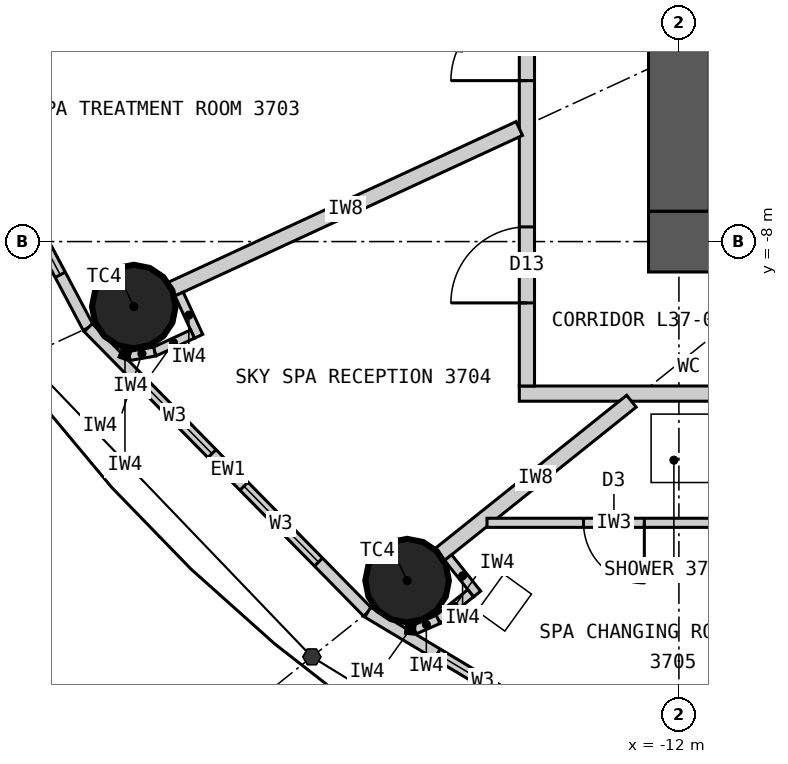
"""IFC4 building model, lengths in metres.
Left out: names, types, materials, properties, quantities, classifications, styles, units other than length and angle.
Written with IfcOpenShell. Run it as: python <this file> out.ifc"""

import sys

from ifc_helpers import new_model, si_unit, direction, frame, frame_2d, origin, origin_2d, place, context, subcontext, project, spatial, rectangle, circle, extrude, element, fill, save


model = new_model("IFC4")
c1 = context("Model", 3, precision=1e-05, world=origin(), true_north=direction((0.0, 1.0)))
c2 = subcontext(c1, "Body", "Model", "MODEL_VIEW")
j1 = project(units=[si_unit("LENGTHUNIT", "METRE"), si_unit("PLANEANGLEUNIT", "RADIAN")], contexts=[c1])
p1 = place(None, origin())
s1 = spatial("IfcSite", under=j1, at=p1, CompositionType="ELEMENT")
p2 = place(p1, origin())
s2 = spatial("IfcBuilding", under=s1, at=p2, CompositionType="ELEMENT")
p3 = place(p2, frame((0.0, 0.0, 143.4)))
s3 = spatial("IfcBuildingStorey", under=s2, at=p3, CompositionType="ELEMENT", Elevation=143.4)
for number, where, z_axis, x_axis in (
    (1, (-19.172, -8.855, 0.0), (0.0, 0.0, 1.0), (1.0, 0.0, 0.0)),
    (2, (-15.576, -12.461, 0.0), (0.0, 0.0, 1.0), (1.0, 0.0, 0.0)),
):
    element("IfcColumn", number, at=place(p3, frame(where, z_axis=z_axis, x_axis=x_axis)), inside=s3, PredefinedType="COLUMN", context=c2, shape_type="SweptSolid", body=[
        extrude(circle(Radius=0.55, at=origin_2d()), origin(), (0.0, 0.0, 1.0), 3.3),
    ])
p4 = place(p3, frame((12.4, -8.0, 0.0), z_axis=(0.0, 0.0, 1.0), x_axis=(-1.0, 0.0, 0.0)))
e3 = element("IfcWall", 3, at=p4, inside=s3, PredefinedType="SHEAR", context=c2, shape_type="SweptSolid", body=[
    extrude(rectangle(XDim=24.8, YDim=0.8, at=frame_2d((12.4, 0.0))), origin(), (0.0, 0.0, 1.0), 3.3),
])
p5 = place(p4, frame((11.1, 0.0, 0.0)))
e4 = element("IfcOpeningElement", 4, at=p5, cuts=e3, PredefinedType="OPENING", context=c2, shape_type="SweptSolid", body=[
    extrude(rectangle(XDim=1.2, YDim=2.2, at=frame_2d((0.6, 1.1))), frame((0.0, 0.41, 0.0), z_axis=(0.0, -1.0, 0.0), x_axis=(1.0, 0.0, 0.0)), (0.0, 0.0, 1.0), 0.82),
])
p6 = place(p4, frame((18.7, 0.0, 0.0)))
e5 = element("IfcOpeningElement", 5, at=p6, cuts=e3, PredefinedType="OPENING", context=c2, shape_type="SweptSolid", body=[
    extrude(rectangle(XDim=0.9, YDim=2.2, at=frame_2d((0.45, 1.1))), frame((0.0, 0.41, 0.0), z_axis=(0.0, -1.0, 0.0), x_axis=(1.0, 0.0, 0.0)), (0.0, 0.0, 1.0), 0.82),
])
p7 = place(p3, frame((-12.0, 7.6, 0.0), z_axis=(0.0, 0.0, 1.0), x_axis=(0.0, -1.0, 0.0)))
e6 = element("IfcWall", 6, at=p7, inside=s3, PredefinedType="SHEAR", context=c2, shape_type="SweptSolid", body=[
    extrude(rectangle(XDim=15.2, YDim=0.8, at=frame_2d((7.6, 0.0))), origin(), (0.0, 0.0, 1.0), 3.3),
])
p8 = place(p7, frame((6.7, 0.0, 0.0)))
e7 = element("IfcOpeningElement", 7, at=p8, cuts=e6, PredefinedType="OPENING", context=c2, shape_type="SweptSolid", body=[
    extrude(rectangle(XDim=1.8, YDim=2.2, at=frame_2d((0.9, 1.1))), frame((0.0, 0.41, 0.0), z_axis=(0.0, -1.0, 0.0), x_axis=(1.0, 0.0, 0.0)), (0.0, 0.0, 1.0), 0.82),
])
p9 = place(p3, frame((-22.102, -4.738, 0.0), z_axis=(0.0, 0.0, 1.0), x_axis=(0.468428906714, -0.883501193748, 0.0)))
e8 = element("IfcWall", 8, at=p9, inside=s3, PredefinedType="ELEMENTEDWALL", context=c2, shape_type="SweptSolid", body=[
    extrude(rectangle(XDim=4.974, YDim=0.15, at=frame_2d((2.487, 0.0))), origin(), (0.0, 0.0, 1.0), 3.12),
])
p10 = place(p9, frame((0.787, 0.0, 0.9)))
e9 = element("IfcOpeningElement", 9, at=p10, cuts=e8, PredefinedType="OPENING", context=c2, shape_type="SweptSolid", body=[
    extrude(rectangle(XDim=1.4, YDim=1.9, at=frame_2d((0.7, 0.95))), frame((0.0, 0.085, 0.0), z_axis=(0.0, -1.0, 0.0), x_axis=(1.0, 0.0, 0.0)), (0.0, 0.0, 1.0), 0.17),
])
p11 = place(p9, frame((2.787, 0.0, 0.9)))
e10 = element("IfcOpeningElement", 10, at=p11, cuts=e8, PredefinedType="OPENING", context=c2, shape_type="SweptSolid", body=[
    extrude(rectangle(XDim=1.4, YDim=1.9, at=frame_2d((0.7, 0.95))), frame((0.0, 0.085, 0.0), z_axis=(0.0, -1.0, 0.0), x_axis=(1.0, 0.0, 0.0)), (0.0, 0.0, 1.0), 0.17),
])
p12 = place(p3, frame((-19.772, -9.132, 0.0), z_axis=(0.0, 0.0, 1.0), x_axis=(0.700727467776, -0.71342905457, 0.0)))
e11 = element("IfcWall", 11, at=p12, inside=s3, PredefinedType="ELEMENTEDWALL", context=c2, shape_type="SweptSolid", body=[
    extrude(rectangle(XDim=5.247, YDim=0.15, at=frame_2d((2.624, 0.0))), origin(), (0.0, 0.0, 1.0), 3.12),
])
p13 = place(p12, frame((0.924, 0.0, 0.9)))
e12 = element("IfcOpeningElement", 12, at=p13, cuts=e11, PredefinedType="OPENING", context=c2, shape_type="SweptSolid", body=[
    extrude(rectangle(XDim=1.4, YDim=1.9, at=frame_2d((0.7, 0.95))), frame((0.0, 0.085, 0.0), z_axis=(0.0, -1.0, 0.0), x_axis=(1.0, 0.0, 0.0)), (0.0, 0.0, 1.0), 0.17),
])
p14 = place(p12, frame((2.924, 0.0, 0.9)))
e13 = element("IfcOpeningElement", 13, at=p14, cuts=e11, PredefinedType="OPENING", context=c2, shape_type="SweptSolid", body=[
    extrude(rectangle(XDim=1.4, YDim=1.9, at=frame_2d((0.7, 0.95))), frame((0.0, 0.085, 0.0), z_axis=(0.0, -1.0, 0.0), x_axis=(1.0, 0.0, 0.0)), (0.0, 0.0, 1.0), 0.17),
])
p15 = place(p3, frame((-16.095, -12.876, 0.0), z_axis=(0.0, 0.0, 1.0), x_axis=(0.857695199231, -0.514158482587, 0.0)))
e14 = element("IfcWall", 14, at=p15, inside=s3, PredefinedType="ELEMENTEDWALL", context=c2, shape_type="SweptSolid", body=[
    extrude(rectangle(XDim=5.536, YDim=0.15, at=frame_2d((2.768, 0.0))), origin(), (0.0, 0.0, 1.0), 3.12),
])
p16 = place(p15, frame((1.068, 0.0, 0.9)))
e15 = element("IfcOpeningElement", 15, at=p16, cuts=e14, PredefinedType="OPENING", context=c2, shape_type="SweptSolid", body=[
    extrude(rectangle(XDim=1.4, YDim=1.9, at=frame_2d((0.7, 0.95))), frame((0.0, 0.085, 0.0), z_axis=(0.0, -1.0, 0.0), x_axis=(1.0, 0.0, 0.0)), (0.0, 0.0, 1.0), 0.17),
])
p17 = place(p15, frame((3.068, 0.0, 0.9)))
e16 = element("IfcOpeningElement", 16, at=p17, cuts=e14, PredefinedType="OPENING", context=c2, shape_type="SweptSolid", body=[
    extrude(rectangle(XDim=1.4, YDim=1.9, at=frame_2d((0.7, 0.95))), frame((0.0, 0.085, 0.0), z_axis=(0.0, -1.0, 0.0), x_axis=(1.0, 0.0, 0.0)), (0.0, 0.0, 1.0), 0.17),
])
p18 = place(p3, frame((14.1, -10.0, 0.0), z_axis=(0.0, 0.0, 1.0), x_axis=(-1.0, 0.0, 0.0)))
e17 = element("IfcWall", 17, at=p18, inside=s3, PredefinedType="PARTITIONING", context=c2, shape_type="SweptSolid", body=[
    extrude(rectangle(XDim=28.2, YDim=0.2, at=frame_2d((14.1, 0.0))), origin(), (0.0, 0.0, 1.0), 3.12),
])
p19 = place(p18, frame((23.045, 0.0, 0.0)))
e18 = element("IfcOpeningElement", 18, at=p19, cuts=e17, PredefinedType="OPENING", context=c2, shape_type="SweptSolid", body=[
    extrude(rectangle(XDim=1.0, YDim=2.2, at=frame_2d((0.5, 1.1))), frame((0.0, 0.11, 0.0), z_axis=(0.0, -1.0, 0.0), x_axis=(1.0, 0.0, 0.0)), (0.0, 0.0, 1.0), 0.22),
])
p20 = place(p18, frame((18.529, 0.0, 0.0)))
e19 = element("IfcOpeningElement", 19, at=p20, cuts=e17, PredefinedType="OPENING", context=c2, shape_type="SweptSolid", body=[
    extrude(rectangle(XDim=1.0, YDim=2.2, at=frame_2d((0.5, 1.1))), frame((0.0, 0.11, 0.0), z_axis=(0.0, -1.0, 0.0), x_axis=(1.0, 0.0, 0.0)), (0.0, 0.0, 1.0), 0.22),
])
p21 = place(p18, frame((13.923, 0.0, 0.0)))
e20 = element("IfcOpeningElement", 20, at=p21, cuts=e17, PredefinedType="OPENING", context=c2, shape_type="SweptSolid", body=[
    extrude(rectangle(XDim=1.0, YDim=2.2, at=frame_2d((0.5, 1.1))), frame((0.0, 0.11, 0.0), z_axis=(0.0, -1.0, 0.0), x_axis=(1.0, 0.0, 0.0)), (0.0, 0.0, 1.0), 0.22),
])
p22 = place(p18, frame((9.35, 0.0, 0.0)))
e21 = element("IfcOpeningElement", 21, at=p22, cuts=e17, PredefinedType="OPENING", context=c2, shape_type="SweptSolid", body=[
    extrude(rectangle(XDim=1.6, YDim=2.4, at=frame_2d((0.8, 1.2))), frame((0.0, 0.11, 0.0), z_axis=(0.0, -1.0, 0.0), x_axis=(1.0, 0.0, 0.0)), (0.0, 0.0, 1.0), 0.22),
])
p23 = place(p3, frame((-14.0, 9.9, 0.0), z_axis=(0.0, 0.0, 1.0), x_axis=(0.0, -1.0, 0.0)))
e22 = element("IfcWall", 22, at=p23, inside=s3, PredefinedType="PARTITIONING", context=c2, shape_type="SweptSolid", body=[
    extrude(rectangle(XDim=19.8, YDim=0.2, at=frame_2d((9.9, 0.0))), origin(), (0.0, 0.0, 1.0), 3.12),
])
p24 = place(p23, frame((8.718, 0.0, 0.0)))
e23 = element("IfcOpeningElement", 23, at=p24, cuts=e22, PredefinedType="OPENING", context=c2, shape_type="SweptSolid", body=[
    extrude(rectangle(XDim=1.0, YDim=2.2, at=frame_2d((0.5, 1.1))), frame((0.0, 0.11, 0.0), z_axis=(0.0, -1.0, 0.0), x_axis=(1.0, 0.0, 0.0)), (0.0, 0.0, 1.0), 0.22),
])
p25 = place(p23, frame((11.74, 0.0, 0.0)))
e24 = element("IfcOpeningElement", 24, at=p25, cuts=e22, PredefinedType="OPENING", context=c2, shape_type="SweptSolid", body=[
    extrude(rectangle(XDim=1.0, YDim=2.2, at=frame_2d((0.5, 1.1))), frame((0.0, 0.11, 0.0), z_axis=(0.0, -1.0, 0.0), x_axis=(1.0, 0.0, 0.0)), (0.0, 0.0, 1.0), 0.22),
])
p26 = place(p23, frame((14.782, 0.0, 0.0)))
e25 = element("IfcOpeningElement", 25, at=p26, cuts=e22, PredefinedType="OPENING", context=c2, shape_type="SweptSolid", body=[
    extrude(rectangle(XDim=1.0, YDim=2.2, at=frame_2d((0.5, 1.1))), frame((0.0, 0.11, 0.0), z_axis=(0.0, -1.0, 0.0), x_axis=(1.0, 0.0, 0.0)), (0.0, 0.0, 1.0), 0.22),
])
p27 = place(p23, frame((17.707, 0.0, 0.0)))
e26 = element("IfcOpeningElement", 26, at=p27, cuts=e22, PredefinedType="OPENING", context=c2, shape_type="SweptSolid", body=[
    extrude(rectangle(XDim=1.0, YDim=2.2, at=frame_2d((0.5, 1.1))), frame((0.0, 0.11, 0.0), z_axis=(0.0, -1.0, 0.0), x_axis=(1.0, 0.0, 0.0)), (0.0, 0.0, 1.0), 0.22),
])
p28 = place(p23, frame((3.824, 0.0, 0.0)))
e27 = element("IfcOpeningElement", 27, at=p28, cuts=e22, PredefinedType="OPENING", context=c2, shape_type="SweptSolid", body=[
    extrude(rectangle(XDim=1.0, YDim=2.2, at=frame_2d((0.5, 1.1))), frame((0.0, 0.11, 0.0), z_axis=(0.0, -1.0, 0.0), x_axis=(1.0, 0.0, 0.0)), (0.0, 0.0, 1.0), 0.22),
])
p29 = place(p3, frame((-14.1, -6.512, 0.0), z_axis=(0.0, 0.0, 1.0), x_axis=(-0.907823150669, -0.419353224751, 0.0)))
e28 = element("IfcWall", 28, at=p29, inside=s3, PredefinedType="PARTITIONING", context=c2, shape_type="SweptSolid", body=[
    extrude(rectangle(XDim=5.037, YDim=0.2, at=frame_2d((2.519, 0.0))), origin(), (0.0, 0.0, 1.0), 2.22),
])
p30 = place(p3, frame((-12.625, -10.1, 0.0), z_axis=(0.0, 0.0, 1.0), x_axis=(-0.780876185034, -0.624685827954, 0.0)))
e29 = element("IfcWall", 29, at=p30, inside=s3, PredefinedType="PARTITIONING", context=c2, shape_type="SweptSolid", body=[
    extrude(rectangle(XDim=3.229, YDim=0.2, at=frame_2d((1.615, 0.0))), origin(), (0.0, 0.0, 1.0), 2.27),
])
p31 = place(p3, frame((-14.525, -11.7, 0.0), z_axis=(0.0, 0.0, 1.0), x_axis=(1.0, 0.0, 0.0)))
e30 = element("IfcWall", 30, at=p31, inside=s3, PredefinedType="PARTITIONING", context=c2, shape_type="SweptSolid", body=[
    extrude(rectangle(XDim=3.34, YDim=0.12, at=frame_2d((1.67, 0.0))), origin(), (0.0, 0.0, 1.0), 3.12),
])
p32 = place(p31, frame((1.27, 0.0, 0.0)))
e31 = element("IfcOpeningElement", 31, at=p32, cuts=e30, PredefinedType="OPENING", context=c2, shape_type="SweptSolid", body=[
    extrude(rectangle(XDim=0.8, YDim=2.1, at=frame_2d((0.4, 1.05))), frame((0.0, 0.07, 0.0), z_axis=(0.0, -1.0, 0.0), x_axis=(1.0, 0.0, 0.0)), (0.0, 0.0, 1.0), 0.14),
])
p33 = place(p3, frame((-18.576, -8.69, 0.0), z_axis=(0.0, 0.0, 1.0), x_axis=(0.419083463716, -0.907947713494, 0.0)))
e32 = element("IfcWall", 32, at=p33, inside=s3, PredefinedType="PARTITIONING", context=c2, shape_type="SweptSolid", body=[
    extrude(rectangle(XDim=0.612, YDim=0.12, at=frame_2d((0.306, 0.0))), origin(), (0.0, 0.0, 1.0), 3.12),
])
p34 = place(p3, frame((-18.399, -9.217, 0.0), z_axis=(0.0, 0.0, 1.0), x_axis=(-0.907933393845, -0.419114485961, 0.0)))
e33 = element("IfcWall", 33, at=p34, inside=s3, PredefinedType="PARTITIONING", context=c2, shape_type="SweptSolid", body=[
    extrude(rectangle(XDim=0.55, YDim=0.12, at=frame_2d((0.275, 0.0))), origin(), (0.0, 0.0, 1.0), 3.12),
])
p35 = place(p3, frame((-18.899, -9.447, 0.0), z_axis=(0.0, 0.0, 1.0), x_axis=(-0.985338822624, -0.170608923066, 0.0)))
e34 = element("IfcWall", 34, at=p35, inside=s3, PredefinedType="PARTITIONING", context=c2, shape_type="SweptSolid", body=[
    extrude(rectangle(XDim=0.338, YDim=0.12, at=frame_2d((0.169, 0.0))), origin(), (0.0, 0.0, 1.0), 3.12),
])
p36 = place(p3, frame((-19.231, -9.505, 0.0), z_axis=(0.0, 0.0, 1.0), x_axis=(-0.938377418573, 0.345612239817, 0.0)))
e35 = element("IfcWall", 35, at=p36, inside=s3, PredefinedType="PARTITIONING", context=c2, shape_type="SweptSolid", body=[
    extrude(rectangle(XDim=0.122, YDim=0.12, at=frame_2d((0.061, 0.0))), origin(), (0.0, 0.0, 1.0), 3.12),
])
p37 = place(p3, frame((-15.037, -12.158, 0.0), z_axis=(0.0, 0.0, 1.0), x_axis=(0.624840920722, -0.78075208856, 0.0)))
e36 = element("IfcWall", 36, at=p37, inside=s3, PredefinedType="PARTITIONING", context=c2, shape_type="SweptSolid", body=[
    extrude(rectangle(XDim=0.612, YDim=0.12, at=frame_2d((0.306, 0.0))), origin(), (0.0, 0.0, 1.0), 3.12),
])
p38 = place(p3, frame((-14.739, -12.627, 0.0), z_axis=(0.0, 0.0, 1.0), x_axis=(-0.780912119987, -0.624640905527, 0.0)))
e37 = element("IfcWall", 37, at=p38, inside=s3, PredefinedType="PARTITIONING", context=c2, shape_type="SweptSolid", body=[
    extrude(rectangle(XDim=0.55, YDim=0.12, at=frame_2d((0.275, 0.0))), origin(), (0.0, 0.0, 1.0), 3.12),
])
p39 = place(p3, frame((-15.169, -12.97, 0.0), z_axis=(0.0, 0.0, 1.0), x_axis=(-0.915974725257, -0.401235968838, 0.0)))
e38 = element("IfcWall", 38, at=p39, inside=s3, PredefinedType="PARTITIONING", context=c2, shape_type="SweptSolid", body=[
    extrude(rectangle(XDim=0.338, YDim=0.12, at=frame_2d((0.169, 0.0))), origin(), (0.0, 0.0, 1.0), 3.12),
])
p40 = place(p3, frame((-15.478, -13.106, 0.0), z_axis=(0.0, 0.0, 1.0), x_axis=(-0.993778813557, 0.111371763588, 0.0)))
e39 = element("IfcWall", 39, at=p40, inside=s3, PredefinedType="PARTITIONING", context=c2, shape_type="SweptSolid", body=[
    extrude(rectangle(XDim=0.114, YDim=0.12, at=frame_2d((0.057, 0.0))), origin(), (0.0, 0.0, 1.0), 3.12),
])
p41 = place(p11, origin())
e40 = element("IfcWindow", 40, at=p41, inside=s3, PartitioningType="SINGLE_PANEL", PredefinedType="WINDOW", context=c2, shape_type="SweptSolid", body=[
    extrude(rectangle(XDim=1.4, YDim=1.9, at=frame_2d((0.7, 0.95))), frame((0.0, 0.03, 0.0), z_axis=(0.0, -1.0, 0.0), x_axis=(1.0, 0.0, 0.0)), (0.0, 0.0, 1.0), 0.06),
])
fill(e10, e40)
p42 = place(p13, origin())
e41 = element("IfcWindow", 41, at=p42, inside=s3, PartitioningType="SINGLE_PANEL", PredefinedType="WINDOW", context=c2, shape_type="SweptSolid", body=[
    extrude(rectangle(XDim=1.4, YDim=1.9, at=frame_2d((0.7, 0.95))), frame((0.0, 0.03, 0.0), z_axis=(0.0, -1.0, 0.0), x_axis=(1.0, 0.0, 0.0)), (0.0, 0.0, 1.0), 0.06),
])
fill(e12, e41)
p43 = place(p14, origin())
e42 = element("IfcWindow", 42, at=p43, inside=s3, PartitioningType="SINGLE_PANEL", PredefinedType="WINDOW", context=c2, shape_type="SweptSolid", body=[
    extrude(rectangle(XDim=1.4, YDim=1.9, at=frame_2d((0.7, 0.95))), frame((0.0, 0.03, 0.0), z_axis=(0.0, -1.0, 0.0), x_axis=(1.0, 0.0, 0.0)), (0.0, 0.0, 1.0), 0.06),
])
fill(e13, e42)
p44 = place(p16, origin())
e43 = element("IfcWindow", 43, at=p44, inside=s3, PartitioningType="SINGLE_PANEL", PredefinedType="WINDOW", context=c2, shape_type="SweptSolid", body=[
    extrude(rectangle(XDim=1.4, YDim=1.9, at=frame_2d((0.7, 0.95))), frame((0.0, 0.03, 0.0), z_axis=(0.0, -1.0, 0.0), x_axis=(1.0, 0.0, 0.0)), (0.0, 0.0, 1.0), 0.06),
])
fill(e15, e43)
p45 = place(p26, origin())
e44 = element("IfcDoor", 44, at=p45, inside=s3, OperationType="SINGLE_SWING_RIGHT", PredefinedType="DOOR", context=c2, shape_type="SweptSolid", body=[
    extrude(rectangle(XDim=1.0, YDim=2.2, at=frame_2d((0.5, 1.1))), frame((0.0, 0.025, 0.0), z_axis=(0.0, -1.0, 0.0), x_axis=(1.0, 0.0, 0.0)), (0.0, 0.0, 1.0), 0.05),
])
fill(e25, e44)
p46 = place(p27, origin())
e45 = element("IfcDoor", 45, at=p46, inside=s3, OperationType="SINGLE_SWING_RIGHT", PredefinedType="DOOR", context=c2, shape_type="SweptSolid", body=[
    extrude(rectangle(XDim=1.0, YDim=2.2, at=frame_2d((0.5, 1.1))), frame((0.0, 0.025, 0.0), z_axis=(0.0, -1.0, 0.0), x_axis=(1.0, 0.0, 0.0)), (0.0, 0.0, 1.0), 0.05),
])
fill(e26, e45)
p47 = place(p32, origin())
e46 = element("IfcDoor", 46, at=p47, inside=s3, OperationType="SINGLE_SWING_RIGHT", PredefinedType="DOOR", context=c2, shape_type="SweptSolid", body=[
    extrude(rectangle(XDim=0.8, YDim=2.1, at=frame_2d((0.4, 1.05))), frame((0.0, 0.025, 0.0), z_axis=(0.0, -1.0, 0.0), x_axis=(1.0, 0.0, 0.0)), (0.0, 0.0, 1.0), 0.05),
])
fill(e31, e46)
save(model, sys.argv[1])
